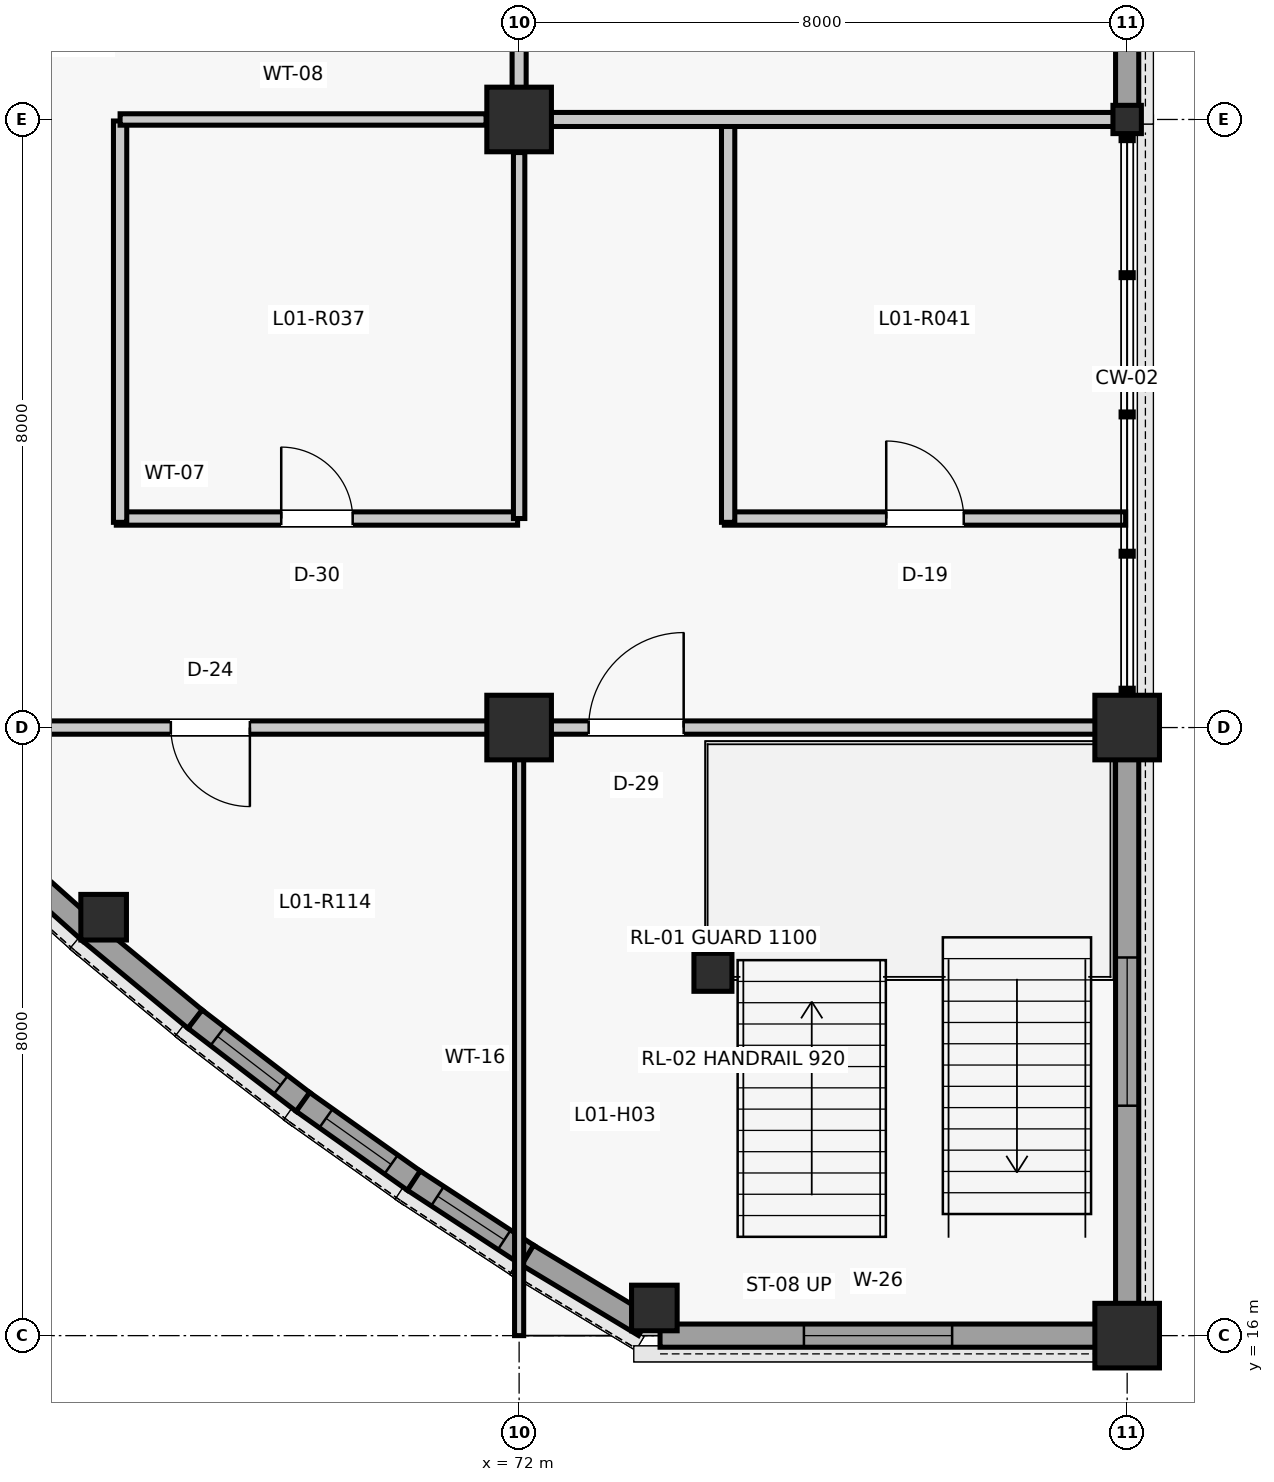
"""IFC4 building model, lengths in metres.
Left out: names, types, materials, properties, quantities, classifications, styles, units other than length and angle.
Written with IfcOpenShell. Run it as: python <this file> out.ifc"""

import sys

from ifc_helpers import new_model, si_unit, direction, frame, frame_2d, origin, origin_2d, place, context, subcontext, project, spatial, rectangle, i_section, extrude, element, fill, save


model = new_model("IFC4")
c1 = context("Model", 3, precision=1e-05, world=origin(), true_north=direction((0.0, 1.0)))
c2 = subcontext(c1, "Body", "Model", "MODEL_VIEW")
j1 = project(units=[si_unit("LENGTHUNIT", "METRE"), si_unit("PLANEANGLEUNIT", "RADIAN")], contexts=[c1])
p1 = place(None, origin())
s1 = spatial("IfcSite", under=j1, at=p1, CompositionType="ELEMENT")
p2 = place(p1, origin())
s2 = spatial("IfcBuilding", under=s1, at=p2, CompositionType="ELEMENT")
p3 = place(p2, frame((0.0, 0.0, 5.28)))
s3 = spatial("IfcBuildingStorey", under=s2, at=p3, CompositionType="ELEMENT", Elevation=5.28)
for number, where, z_axis, x_axis in (
    (1, (72.0, 24.0, 0.0), (0.0, 0.0, 1.0), (1.0, 0.0, 0.0)),
    (2, (72.0, 32.0, 0.0), (0.0, 0.0, 1.0), (1.0, 0.0, 0.0)),
    (3, (80.0, 16.0, 0.0), (0.0, 0.0, 1.0), (1.0, 0.0, 0.0)),
    (4, (80.0, 24.0, 0.0), (0.0, 0.0, 1.0), (1.0, 0.0, 0.0)),
):
    element("IfcColumn", number, at=place(p3, frame(where, z_axis=z_axis, x_axis=x_axis)), inside=s3, PredefinedType="COLUMN", context=c2, shape_type="SweptSolid", body=[
        extrude(rectangle(XDim=0.85, YDim=0.85, at=origin_2d()), origin(), (0.0, 0.0, 1.0), 4.62),
    ])
p4 = place(p3, frame((80.0, 32.0, 0.0), z_axis=(0.0, 0.0, 1.0), x_axis=(1.0, 0.0, 0.0)))
e5 = element("IfcColumn", 5, at=p4, inside=s3, PredefinedType="COLUMN", context=c2, shape_type="SweptSolid", body=[
    extrude(i_section(OverallWidth=0.374, OverallDepth=0.372, WebThickness=0.016, FlangeThickness=0.026, FilletRadius=0.015, at=origin_2d()), origin(), (0.0, 0.0, 1.0), 4.62),
])
for number, where, z_axis, x_axis in (
    (6, (66.533, 21.505, 0.0), (0.0, 0.0, 1.0), (1.0, 0.0, 0.0)),
    (7, (73.779, 16.364, 0.0), (0.0, 0.0, 1.0), (1.0, 0.0, 0.0)),
):
    element("IfcColumn", number, at=place(p3, frame(where, z_axis=z_axis, x_axis=x_axis)), inside=s3, PredefinedType="COLUMN", context=c2, shape_type="SweptSolid", body=[
        extrude(rectangle(XDim=0.6, YDim=0.6, at=origin_2d()), origin(), (0.0, 0.0, 1.0), 4.62),
    ])
p5 = place(p3, frame((74.55, 20.78, 0.0), z_axis=(0.0, 0.0, 1.0), x_axis=(1.0, 0.0, 0.0)))
e8 = element("IfcColumn", 8, at=p5, inside=s3, PredefinedType="COLUMN", context=c2, shape_type="SweptSolid", body=[
    extrude(rectangle(XDim=0.5, YDim=0.5, at=origin_2d()), origin(), (0.0, 0.0, 1.0), 2.115),
])
p6 = place(p3, frame((65.024, 22.498, 0.0), z_axis=(0.0, 0.0, 1.0), x_axis=(0.745703543965, -0.666277888361, 0.0)))
e9 = element("IfcWall", 9, at=p6, inside=s3, PredefinedType="SOLIDWALL", context=c2, shape_type="SweptSolid", body=[
    extrude(rectangle(XDim=1.795, YDim=0.305, at=frame_2d((0.897, 0.0))), origin(), (0.0, 0.0, 1.0), 4.335),
])
p7 = place(p3, frame((66.358, 21.306, 0.0), z_axis=(0.0, 0.0, 1.0), x_axis=(0.769991012207, -0.638054732073, 0.0)))
e10 = element("IfcWall", 10, at=p7, inside=s3, PredefinedType="SOLIDWALL", context=c2, shape_type="SweptSolid", body=[
    extrude(rectangle(XDim=1.795, YDim=0.305, at=frame_2d((0.897, 0.0))), origin(), (0.0, 0.0, 1.0), 4.335),
])
p8 = place(p3, frame((67.736, 20.164, 0.0), z_axis=(0.0, 0.0, 1.0), x_axis=(0.793341406114, -0.608776981616, 0.0)))
e11 = element("IfcWall", 11, at=p8, inside=s3, PredefinedType="SOLIDWALL", context=c2, shape_type="SweptSolid", body=[
    extrude(rectangle(XDim=1.795, YDim=0.305, at=frame_2d((0.897, 0.0))), origin(), (0.0, 0.0, 1.0), 4.335),
])
p9 = place(p8, frame((0.373, 0.0, 0.9)))
e12 = element("IfcOpeningElement", 12, at=p9, cuts=e11, PredefinedType="OPENING", context=c2, shape_type="SweptSolid", body=[
    extrude(rectangle(XDim=1.05, YDim=1.85, at=frame_2d((0.525, 0.925))), frame((0.0, 0.162, 0.0), z_axis=(0.0, -1.0, 0.0), x_axis=(1.0, 0.0, 0.0)), (0.0, 0.0, 1.0), 0.325),
])
p10 = place(p3, frame((69.156, 19.075, 0.0), z_axis=(0.0, 0.0, 1.0), x_axis=(0.815567185578, -0.578662393636, 0.0)))
e13 = element("IfcWall", 13, at=p10, inside=s3, PredefinedType="SOLIDWALL", context=c2, shape_type="SweptSolid", body=[
    extrude(rectangle(XDim=1.795, YDim=0.305, at=frame_2d((0.897, 0.0))), origin(), (0.0, 0.0, 1.0), 4.335),
])
p11 = place(p10, frame((0.373, 0.0, 0.9)))
e14 = element("IfcOpeningElement", 14, at=p11, cuts=e13, PredefinedType="OPENING", context=c2, shape_type="SweptSolid", body=[
    extrude(rectangle(XDim=1.05, YDim=1.85, at=frame_2d((0.525, 0.925))), frame((0.0, 0.162, 0.0), z_axis=(0.0, -1.0, 0.0), x_axis=(1.0, 0.0, 0.0)), (0.0, 0.0, 1.0), 0.325),
])
p12 = place(p3, frame((70.615, 18.039, 0.0), z_axis=(0.0, 0.0, 1.0), x_axis=(0.836686786408, -0.547681678944, 0.0)))
e15 = element("IfcWall", 15, at=p12, inside=s3, PredefinedType="SOLIDWALL", context=c2, shape_type="SweptSolid", body=[
    extrude(rectangle(XDim=1.795, YDim=0.305, at=frame_2d((0.897, 0.0))), origin(), (0.0, 0.0, 1.0), 4.335),
])
p13 = place(p12, frame((0.373, 0.0, 0.9)))
e16 = element("IfcOpeningElement", 16, at=p13, cuts=e15, PredefinedType="OPENING", context=c2, shape_type="SweptSolid", body=[
    extrude(rectangle(XDim=1.05, YDim=1.85, at=frame_2d((0.525, 0.925))), frame((0.0, 0.162, 0.0), z_axis=(0.0, -1.0, 0.0), x_axis=(1.0, 0.0, 0.0)), (0.0, 0.0, 1.0), 0.325),
])
p14 = place(p3, frame((72.112, 17.059, 0.0), z_axis=(0.0, 0.0, 1.0), x_axis=(0.856543302071, -0.51607516088, 0.0)))
e17 = element("IfcWall", 17, at=p14, inside=s3, PredefinedType="SOLIDWALL", context=c2, shape_type="SweptSolid", body=[
    extrude(rectangle(XDim=1.795, YDim=0.305, at=frame_2d((0.897, 0.0))), origin(), (0.0, 0.0, 1.0), 4.335),
])
p15 = place(p3, frame((73.854, 16.0, 0.0), z_axis=(0.0, 0.0, 1.0), x_axis=(1.0, 0.0, 0.0)))
e18 = element("IfcWall", 18, at=p15, inside=s3, PredefinedType="SOLIDWALL", context=c2, shape_type="SweptSolid", body=[
    extrude(rectangle(XDim=5.736, YDim=0.305, at=frame_2d((2.868, 0.0))), origin(), (0.0, 0.0, 1.0), 4.335),
])
p16 = place(p15, frame((1.893, 0.0, 0.9)))
e19 = element("IfcOpeningElement", 19, at=p16, cuts=e18, PredefinedType="OPENING", context=c2, shape_type="SweptSolid", body=[
    extrude(rectangle(XDim=1.95, YDim=2.45, at=frame_2d((0.975, 1.225))), frame((0.0, 0.162, 0.0), z_axis=(0.0, -1.0, 0.0), x_axis=(1.0, 0.0, 0.0)), (0.0, 0.0, 1.0), 0.325),
])
p17 = place(p3, frame((80.0, 16.41, 0.0), z_axis=(0.0, 0.0, 1.0), x_axis=(0.0, 1.0, 0.0)))
e20 = element("IfcWall", 20, at=p17, inside=s3, PredefinedType="SOLIDWALL", context=c2, shape_type="SweptSolid", body=[
    extrude(rectangle(XDim=7.18, YDim=0.305, at=frame_2d((3.59, 0.0))), origin(), (0.0, 0.0, 1.0), 4.019),
])
p18 = place(p17, frame((2.615, 0.0, 0.9)))
e21 = element("IfcOpeningElement", 21, at=p18, cuts=e20, PredefinedType="OPENING", context=c2, shape_type="SweptSolid", body=[
    extrude(rectangle(XDim=1.95, YDim=2.45, at=frame_2d((0.975, 1.225))), frame((0.0, 0.162, 0.0), z_axis=(0.0, -1.0, 0.0), x_axis=(1.0, 0.0, 0.0)), (0.0, 0.0, 1.0), 0.325),
])
p19 = place(p3, frame((80.0, 32.171, 0.0), z_axis=(0.0, 0.0, 1.0), x_axis=(0.0, 1.0, 0.0)))
e22 = element("IfcWall", 22, at=p19, inside=s3, PredefinedType="SOLIDWALL", context=c2, shape_type="SweptSolid", body=[
    extrude(rectangle(XDim=7.658, YDim=0.305, at=frame_2d((3.829, 0.0))), origin(), (0.0, 0.0, 1.0), 3.788),
])
p20 = place(p19, frame((2.779, 0.0, 0.9)))
e23 = element("IfcOpeningElement", 23, at=p20, cuts=e22, PredefinedType="OPENING", context=c2, shape_type="SweptSolid", body=[
    extrude(rectangle(XDim=2.1, YDim=2.4, at=frame_2d((1.05, 1.2))), frame((0.0, 0.162, 0.0), z_axis=(0.0, -1.0, 0.0), x_axis=(1.0, 0.0, 0.0)), (0.0, 0.0, 1.0), 0.325),
])
p21 = place(p3, frame((66.7, 26.75, 0.0), z_axis=(0.0, 0.0, 1.0), x_axis=(1.0, 0.0, 0.0)))
e24 = element("IfcWall", 24, at=p21, inside=s3, PredefinedType="PARTITIONING", context=c2, shape_type="SweptSolid", body=[
    extrude(rectangle(XDim=5.28, YDim=0.175, at=frame_2d((2.64, 0.0))), origin(), (0.0, 0.0, 1.0), 3.787),
])
p22 = place(p21, frame((2.17, 0.0, 0.0)))
e25 = element("IfcOpeningElement", 25, at=p22, cuts=e24, PredefinedType="OPENING", context=c2, shape_type="SweptSolid", body=[
    extrude(rectangle(XDim=0.94, YDim=2.12, at=frame_2d((0.47, 1.06))), frame((0.0, 0.097, 0.0), z_axis=(0.0, -1.0, 0.0), x_axis=(1.0, 0.0, 0.0)), (0.0, 0.0, 1.0), 0.195),
])
p23 = place(p3, frame((66.75, 26.7, 0.0), z_axis=(0.0, 0.0, 1.0), x_axis=(0.0, 1.0, 0.0)))
e26 = element("IfcWall", 26, at=p23, inside=s3, PredefinedType="PARTITIONING", context=c2, shape_type="SweptSolid", body=[
    extrude(rectangle(XDim=5.28, YDim=0.175, at=frame_2d((2.64, 0.0))), origin(), (0.0, 0.0, 1.0), 3.712),
])
p24 = place(p3, frame((66.75, 32.0, 0.0), z_axis=(0.0, 0.0, 1.0), x_axis=(1.0, 0.0, 0.0)))
e27 = element("IfcWall", 27, at=p24, inside=s3, PredefinedType="PARTITIONING", context=c2, shape_type="SweptSolid", body=[
    extrude(rectangle(XDim=4.815, YDim=0.15, at=frame_2d((2.407, 0.0))), origin(), (0.0, 0.0, 1.0), 3.712),
])
p25 = place(p3, frame((72.0, 26.75, 0.0), z_axis=(0.0, 0.0, 1.0), x_axis=(0.0, 1.0, 0.0)))
e28 = element("IfcWall", 28, at=p25, inside=s3, PredefinedType="PARTITIONING", context=c2, shape_type="SweptSolid", body=[
    extrude(rectangle(XDim=4.815, YDim=0.15, at=frame_2d((2.407, 0.0))), origin(), (0.0, 0.0, 1.0), 3.787),
])
p26 = place(p3, frame((74.7, 26.75, 0.0), z_axis=(0.0, 0.0, 1.0), x_axis=(1.0, 0.0, 0.0)))
e29 = element("IfcWall", 29, at=p26, inside=s3, PredefinedType="PARTITIONING", context=c2, shape_type="SweptSolid", body=[
    extrude(rectangle(XDim=5.28, YDim=0.175, at=frame_2d((2.64, 0.0))), origin(), (0.0, 0.0, 1.0), 3.857),
])
p27 = place(p26, frame((2.13, 0.0, 0.0)))
e30 = element("IfcOpeningElement", 30, at=p27, cuts=e29, PredefinedType="OPENING", context=c2, shape_type="SweptSolid", body=[
    extrude(rectangle(XDim=1.02, YDim=2.2, at=frame_2d((0.51, 1.1))), frame((0.0, 0.097, 0.0), z_axis=(0.0, -1.0, 0.0), x_axis=(1.0, 0.0, 0.0)), (0.0, 0.0, 1.0), 0.195),
])
p28 = place(p3, frame((74.75, 26.7, 0.0), z_axis=(0.0, 0.0, 1.0), x_axis=(0.0, 1.0, 0.0)))
e31 = element("IfcWall", 31, at=p28, inside=s3, PredefinedType="PARTITIONING", context=c2, shape_type="SweptSolid", body=[
    extrude(rectangle(XDim=5.28, YDim=0.175, at=frame_2d((2.64, 0.0))), origin(), (0.0, 0.0, 1.0), 3.787),
])
p29 = place(p3, frame((72.0, 16.0, 0.0), z_axis=(0.0, 0.0, 1.0), x_axis=(0.0, 1.0, 0.0)))
e32 = element("IfcWall", 32, at=p29, inside=s3, PredefinedType="PARTITIONING", context=c2, shape_type="SweptSolid", body=[
    extrude(rectangle(XDim=7.585, YDim=0.12, at=frame_2d((3.792, 0.0))), origin(), (0.0, 0.0, 1.0), 4.325),
])
p30 = place(p3, frame((64.29, 24.0, 0.0), z_axis=(0.0, 0.0, 1.0), x_axis=(1.0, 0.0, 0.0)))
e33 = element("IfcWall", 33, at=p30, inside=s3, PredefinedType="PARTITIONING", context=c2, shape_type="SweptSolid", body=[
    extrude(rectangle(XDim=7.295, YDim=0.175, at=frame_2d((3.647, 0.0))), origin(), (0.0, 0.0, 1.0), 3.781),
])
p31 = place(p30, frame((3.127, 0.0, 0.0)))
e34 = element("IfcOpeningElement", 34, at=p31, cuts=e33, PredefinedType="OPENING", context=c2, shape_type="SweptSolid", body=[
    extrude(rectangle(XDim=1.04, YDim=2.18, at=frame_2d((0.52, 1.09))), frame((0.0, 0.097, 0.0), z_axis=(0.0, -1.0, 0.0), x_axis=(1.0, 0.0, 0.0)), (0.0, 0.0, 1.0), 0.195),
])
p32 = place(p3, frame((72.0, 32.415, 0.0), z_axis=(0.0, 0.0, 1.0), x_axis=(0.0, 1.0, 0.0)))
e35 = element("IfcWall", 35, at=p32, inside=s3, PredefinedType="PARTITIONING", context=c2, shape_type="SweptSolid", body=[
    extrude(rectangle(XDim=7.17, YDim=0.185, at=frame_2d((3.585, 0.0))), origin(), (0.0, 0.0, 1.0), 3.857),
])
p33 = place(p32, frame((0.52, 0.0, 0.0)))
e36 = element("IfcOpeningElement", 36, at=p33, cuts=e35, PredefinedType="OPENING", context=c2, shape_type="SweptSolid", body=[
    extrude(rectangle(XDim=0.94, YDim=2.12, at=frame_2d((0.47, 1.06))), frame((0.0, 0.103, 0.0), z_axis=(0.0, -1.0, 0.0), x_axis=(1.0, 0.0, 0.0)), (0.0, 0.0, 1.0), 0.205),
])
p34 = place(p3, frame((72.415, 24.0, 0.0), z_axis=(0.0, 0.0, 1.0), x_axis=(1.0, 0.0, 0.0)))
e37 = element("IfcWall", 37, at=p34, inside=s3, PredefinedType="PARTITIONING", context=c2, shape_type="SweptSolid", body=[
    extrude(rectangle(XDim=7.17, YDim=0.175, at=frame_2d((3.585, 0.0))), origin(), (0.0, 0.0, 1.0), 3.712),
])
p35 = place(p34, frame((0.5, 0.0, 0.0)))
e38 = element("IfcOpeningElement", 38, at=p35, cuts=e37, PredefinedType="OPENING", context=c2, shape_type="SweptSolid", body=[
    extrude(rectangle(XDim=1.25, YDim=2.18, at=frame_2d((0.625, 1.09))), frame((0.0, 0.097, 0.0), z_axis=(0.0, -1.0, 0.0), x_axis=(1.0, 0.0, 0.0)), (0.0, 0.0, 1.0), 0.195),
])
p36 = place(p3, frame((72.415, 32.0, 0.0), z_axis=(0.0, 0.0, 1.0), x_axis=(1.0, 0.0, 0.0)))
e39 = element("IfcWall", 39, at=p36, inside=s3, PredefinedType="PARTITIONING", context=c2, shape_type="SweptSolid", body=[
    extrude(rectangle(XDim=7.408, YDim=0.185, at=frame_2d((3.704, 0.0))), origin(), (0.0, 0.0, 1.0), 3.787),
])
p37 = place(p9, origin())
e40 = element("IfcWindow", 40, at=p37, inside=s3, PartitioningType="SINGLE_PANEL", PredefinedType="WINDOW", context=c2, shape_type="SweptSolid", body=[
    extrude(rectangle(XDim=1.05, YDim=1.85, at=frame_2d((0.525, 0.925))), frame((0.0, 0.03, 0.0), z_axis=(0.0, -1.0, 0.0), x_axis=(1.0, 0.0, 0.0)), (0.0, 0.0, 1.0), 0.06),
])
fill(e12, e40)
p38 = place(p11, origin())
e41 = element("IfcWindow", 41, at=p38, inside=s3, PartitioningType="SINGLE_PANEL", PredefinedType="WINDOW", context=c2, shape_type="SweptSolid", body=[
    extrude(rectangle(XDim=1.05, YDim=1.85, at=frame_2d((0.525, 0.925))), frame((0.0, 0.03, 0.0), z_axis=(0.0, -1.0, 0.0), x_axis=(1.0, 0.0, 0.0)), (0.0, 0.0, 1.0), 0.06),
])
fill(e14, e41)
p39 = place(p13, origin())
e42 = element("IfcWindow", 42, at=p39, inside=s3, PartitioningType="SINGLE_PANEL", PredefinedType="WINDOW", context=c2, shape_type="SweptSolid", body=[
    extrude(rectangle(XDim=1.05, YDim=1.85, at=frame_2d((0.525, 0.925))), frame((0.0, 0.03, 0.0), z_axis=(0.0, -1.0, 0.0), x_axis=(1.0, 0.0, 0.0)), (0.0, 0.0, 1.0), 0.06),
])
fill(e16, e42)
p40 = place(p16, origin())
e43 = element("IfcWindow", 43, at=p40, inside=s3, PartitioningType="SINGLE_PANEL", PredefinedType="WINDOW", context=c2, shape_type="SweptSolid", body=[
    extrude(rectangle(XDim=1.95, YDim=2.45, at=frame_2d((0.975, 1.225))), frame((0.0, 0.03, 0.0), z_axis=(0.0, -1.0, 0.0), x_axis=(1.0, 0.0, 0.0)), (0.0, 0.0, 1.0), 0.06),
])
fill(e19, e43)
p41 = place(p18, origin())
e44 = element("IfcWindow", 44, at=p41, inside=s3, PartitioningType="SINGLE_PANEL", PredefinedType="WINDOW", context=c2, shape_type="SweptSolid", body=[
    extrude(rectangle(XDim=1.95, YDim=2.45, at=frame_2d((0.975, 1.225))), frame((0.0, 0.03, 0.0), z_axis=(0.0, -1.0, 0.0), x_axis=(1.0, 0.0, 0.0)), (0.0, 0.0, 1.0), 0.06),
])
fill(e21, e44)
p42 = place(p22, origin())
e45 = element("IfcDoor", 45, at=p42, inside=s3, OperationType="SINGLE_SWING_LEFT", PredefinedType="DOOR", context=c2, shape_type="SweptSolid", body=[
    extrude(rectangle(XDim=0.94, YDim=2.12, at=frame_2d((0.47, 1.06))), frame((0.0, 0.025, 0.0), z_axis=(0.0, -1.0, 0.0), x_axis=(1.0, 0.0, 0.0)), (0.0, 0.0, 1.0), 0.05),
])
fill(e25, e45)
p43 = place(p27, origin())
e46 = element("IfcDoor", 46, at=p43, inside=s3, OperationType="SINGLE_SWING_LEFT", PredefinedType="DOOR", context=c2, shape_type="SweptSolid", body=[
    extrude(rectangle(XDim=1.02, YDim=2.2, at=frame_2d((0.51, 1.1))), frame((0.0, 0.025, 0.0), z_axis=(0.0, -1.0, 0.0), x_axis=(1.0, 0.0, 0.0)), (0.0, 0.0, 1.0), 0.05),
])
fill(e30, e46)
p44 = place(p31, frame((1.04, 0.0, 0.0), z_axis=(0.0, 0.0, 1.0), x_axis=(-1.0, 0.0, 0.0)))
e47 = element("IfcDoor", 47, at=p44, inside=s3, OperationType="SINGLE_SWING_RIGHT", PredefinedType="DOOR", context=c2, shape_type="SweptSolid", body=[
    extrude(rectangle(XDim=1.04, YDim=2.18, at=frame_2d((0.52, 1.09))), frame((0.0, 0.025, 0.0), z_axis=(0.0, -1.0, 0.0), x_axis=(1.0, 0.0, 0.0)), (0.0, 0.0, 1.0), 0.05),
])
fill(e34, e47)
p45 = place(p35, origin())
e48 = element("IfcDoor", 48, at=p45, inside=s3, OperationType="SINGLE_SWING_RIGHT", PredefinedType="DOOR", context=c2, shape_type="SweptSolid", body=[
    extrude(rectangle(XDim=1.25, YDim=2.18, at=frame_2d((0.625, 1.09))), frame((0.0, 0.025, 0.0), z_axis=(0.0, -1.0, 0.0), x_axis=(1.0, 0.0, 0.0)), (0.0, 0.0, 1.0), 0.05),
])
fill(e38, e48)
save(model, sys.argv[1])
